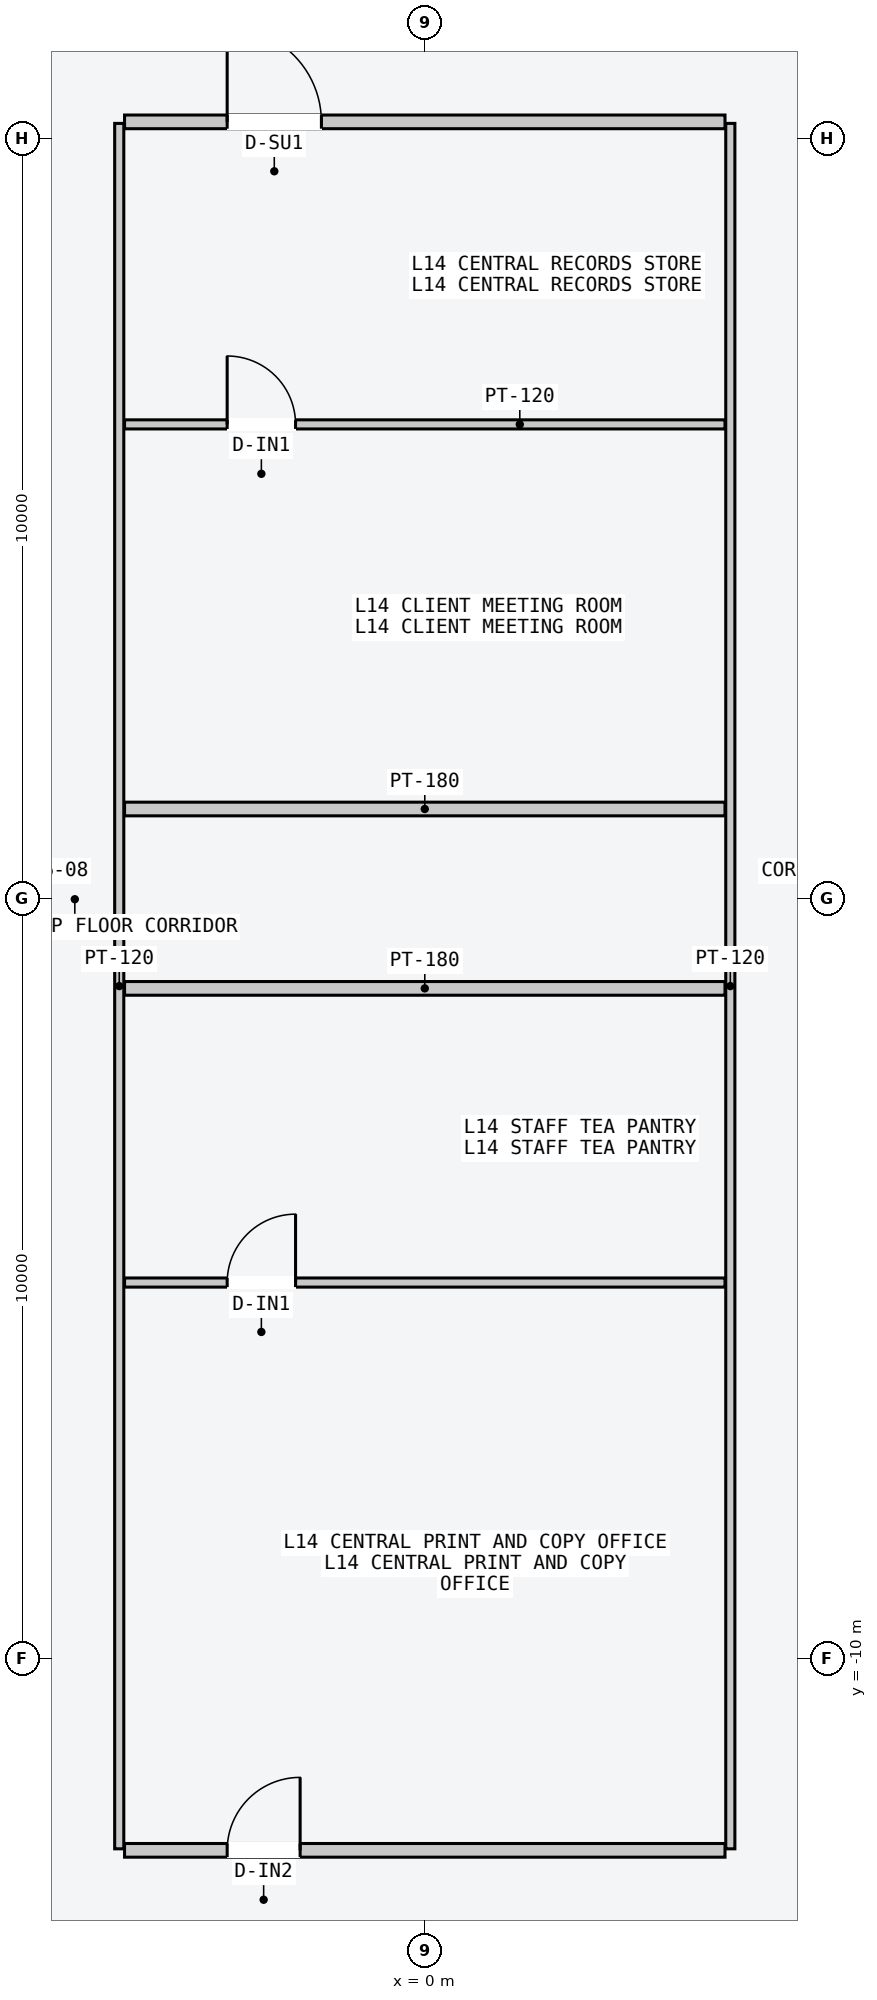
"""IFC4 building model, lengths in metres.
Left out: names, types, materials, properties, quantities, classifications, styles, units other than length and angle.
Written with IfcOpenShell. Run it as: python <this file> out.ifc"""

import sys

from ifc_helpers import new_model, si_unit, direction, frame, frame_2d, origin, place, context, subcontext, project, spatial, rectangle, extrude, element, fill, save


model = new_model("IFC4")
c1 = context("Model", 3, precision=1e-05, world=origin(), true_north=direction((0.0, 1.0)))
c2 = subcontext(c1, "Body", "Model", "MODEL_VIEW")
j1 = project(units=[si_unit("LENGTHUNIT", "METRE"), si_unit("PLANEANGLEUNIT", "RADIAN")], contexts=[c1])
p1 = place(None, origin())
s1 = spatial("IfcSite", under=j1, at=p1, CompositionType="ELEMENT")
p2 = place(p1, origin())
s2 = spatial("IfcBuilding", under=s1, at=p2, CompositionType="ELEMENT")
p3 = place(p2, frame((0.0, 0.0, 56.4)))
s3 = spatial("IfcBuildingStorey", under=s2, at=p3, CompositionType="ELEMENT", Elevation=56.4)
for number, where, z_axis, x_axis in (
    (1, (-4.02, -12.5, 0.0), (0.0, 0.0, 1.0), (0.0, 1.0, 0.0)),
    (2, (4.02, -12.5, 0.0), (0.0, 0.0, 1.0), (0.0, 1.0, 0.0)),
):
    element("IfcWall", number, at=place(p3, frame(where, z_axis=z_axis, x_axis=x_axis)), inside=s3, PredefinedType="PARTITIONING", context=c2, shape_type="SweptSolid", body=[
        extrude(rectangle(XDim=22.7, YDim=0.12, at=frame_2d((11.35, 0.0))), origin(), (0.0, 0.0, 1.0), 3.4),
    ])
p4 = place(p3, frame((-3.95, 1.18, 0.0), z_axis=(0.0, 0.0, 1.0), x_axis=(1.0, 0.0, 0.0)))
e3 = element("IfcWall", 3, at=p4, inside=s3, PredefinedType="PARTITIONING", context=c2, shape_type="SweptSolid", body=[
    extrude(rectangle(XDim=7.9, YDim=0.18, at=frame_2d((3.95, 0.0))), origin(), (0.0, 0.0, 1.0), 3.4),
])
p5 = place(p3, frame((-3.95, 10.22, 0.0), z_axis=(0.0, 0.0, 1.0), x_axis=(1.0, 0.0, 0.0)))
e4 = element("IfcWall", 4, at=p5, inside=s3, PredefinedType="PARTITIONING", context=c2, shape_type="SweptSolid", body=[
    extrude(rectangle(XDim=7.9, YDim=0.18, at=frame_2d((3.95, 0.0))), origin(), (0.0, 0.0, 1.0), 3.4),
])
p6 = place(p5, frame((1.35, 0.0, 0.0)))
e5 = element("IfcOpeningElement", 5, at=p6, cuts=e4, PredefinedType="OPENING", context=c2, shape_type="SweptSolid", body=[
    extrude(rectangle(XDim=1.24, YDim=2.24, at=frame_2d((0.62, 1.12))), frame((0.0, 0.1, 0.0), z_axis=(0.0, -1.0, 0.0), x_axis=(1.0, 0.0, 0.0)), (0.0, 0.0, 1.0), 0.2),
])
p7 = place(p3, frame((-3.95, -1.18, 0.0), z_axis=(0.0, 0.0, 1.0), x_axis=(1.0, 0.0, 0.0)))
e6 = element("IfcWall", 6, at=p7, inside=s3, PredefinedType="PARTITIONING", context=c2, shape_type="SweptSolid", body=[
    extrude(rectangle(XDim=7.9, YDim=0.18, at=frame_2d((3.95, 0.0))), origin(), (0.0, 0.0, 1.0), 3.4),
])
p8 = place(p3, frame((-3.95, -12.52, 0.0), z_axis=(0.0, 0.0, 1.0), x_axis=(1.0, 0.0, 0.0)))
e7 = element("IfcWall", 7, at=p8, inside=s3, PredefinedType="PARTITIONING", context=c2, shape_type="SweptSolid", body=[
    extrude(rectangle(XDim=7.9, YDim=0.18, at=frame_2d((3.95, 0.0))), origin(), (0.0, 0.0, 1.0), 3.4),
])
p9 = place(p8, frame((1.35, 0.0, 0.0)))
e8 = element("IfcOpeningElement", 8, at=p9, cuts=e7, PredefinedType="OPENING", context=c2, shape_type="SweptSolid", body=[
    extrude(rectangle(XDim=0.96, YDim=2.18, at=frame_2d((0.48, 1.09))), frame((0.0, 0.1, 0.0), z_axis=(0.0, -1.0, 0.0), x_axis=(1.0, 0.0, 0.0)), (0.0, 0.0, 1.0), 0.2),
])
p10 = place(p3, frame((-3.95, 6.24, 0.0), z_axis=(0.0, 0.0, 1.0), x_axis=(1.0, 0.0, 0.0)))
e9 = element("IfcWall", 9, at=p10, inside=s3, PredefinedType="PARTITIONING", context=c2, shape_type="SweptSolid", body=[
    extrude(rectangle(XDim=7.9, YDim=0.12, at=frame_2d((3.95, 0.0))), origin(), (0.0, 0.0, 1.0), 3.4),
])
p11 = place(p10, frame((1.35, 0.0, 0.0)))
e10 = element("IfcOpeningElement", 10, at=p11, cuts=e9, PredefinedType="OPENING", context=c2, shape_type="SweptSolid", body=[
    extrude(rectangle(XDim=0.9, YDim=2.15, at=frame_2d((0.45, 1.075))), frame((0.0, 0.07, 0.0), z_axis=(0.0, -1.0, 0.0), x_axis=(1.0, 0.0, 0.0)), (0.0, 0.0, 1.0), 0.14),
])
p12 = place(p3, frame((-3.95, -5.05, 0.0), z_axis=(0.0, 0.0, 1.0), x_axis=(1.0, 0.0, 0.0)))
e11 = element("IfcWall", 11, at=p12, inside=s3, PredefinedType="PARTITIONING", context=c2, shape_type="SweptSolid", body=[
    extrude(rectangle(XDim=7.9, YDim=0.12, at=frame_2d((3.95, 0.0))), origin(), (0.0, 0.0, 1.0), 3.4),
])
p13 = place(p12, frame((1.35, 0.0, 0.0)))
e12 = element("IfcOpeningElement", 12, at=p13, cuts=e11, PredefinedType="OPENING", context=c2, shape_type="SweptSolid", body=[
    extrude(rectangle(XDim=0.9, YDim=2.15, at=frame_2d((0.45, 1.075))), frame((0.0, 0.07, 0.0), z_axis=(0.0, -1.0, 0.0), x_axis=(1.0, 0.0, 0.0)), (0.0, 0.0, 1.0), 0.14),
])
p14 = place(p6, origin())
e13 = element("IfcDoor", 13, at=p14, inside=s3, OperationType="SINGLE_SWING_LEFT", PredefinedType="DOOR", context=c2, shape_type="SweptSolid", body=[
    extrude(rectangle(XDim=1.24, YDim=2.24, at=frame_2d((0.62, 1.12))), frame((0.0, 0.025, 0.0), z_axis=(0.0, -1.0, 0.0), x_axis=(1.0, 0.0, 0.0)), (0.0, 0.0, 1.0), 0.05),
])
fill(e5, e13)
p15 = place(p9, origin())
e14 = element("IfcDoor", 14, at=p15, inside=s3, OperationType="SINGLE_SWING_RIGHT", PredefinedType="DOOR", context=c2, shape_type="SweptSolid", body=[
    extrude(rectangle(XDim=0.96, YDim=2.18, at=frame_2d((0.48, 1.09))), frame((0.0, 0.025, 0.0), z_axis=(0.0, -1.0, 0.0), x_axis=(1.0, 0.0, 0.0)), (0.0, 0.0, 1.0), 0.05),
])
fill(e8, e14)
p16 = place(p11, origin())
e15 = element("IfcDoor", 15, at=p16, inside=s3, OperationType="SINGLE_SWING_LEFT", PredefinedType="DOOR", context=c2, shape_type="SweptSolid", body=[
    extrude(rectangle(XDim=0.9, YDim=2.15, at=frame_2d((0.45, 1.075))), frame((0.0, 0.025, 0.0), z_axis=(0.0, -1.0, 0.0), x_axis=(1.0, 0.0, 0.0)), (0.0, 0.0, 1.0), 0.05),
])
fill(e10, e15)
p17 = place(p13, origin())
e16 = element("IfcDoor", 16, at=p17, inside=s3, OperationType="SINGLE_SWING_RIGHT", PredefinedType="DOOR", context=c2, shape_type="SweptSolid", body=[
    extrude(rectangle(XDim=0.9, YDim=2.15, at=frame_2d((0.45, 1.075))), frame((0.0, 0.025, 0.0), z_axis=(0.0, -1.0, 0.0), x_axis=(1.0, 0.0, 0.0)), (0.0, 0.0, 1.0), 0.05),
])
fill(e12, e16)
save(model, sys.argv[1])
